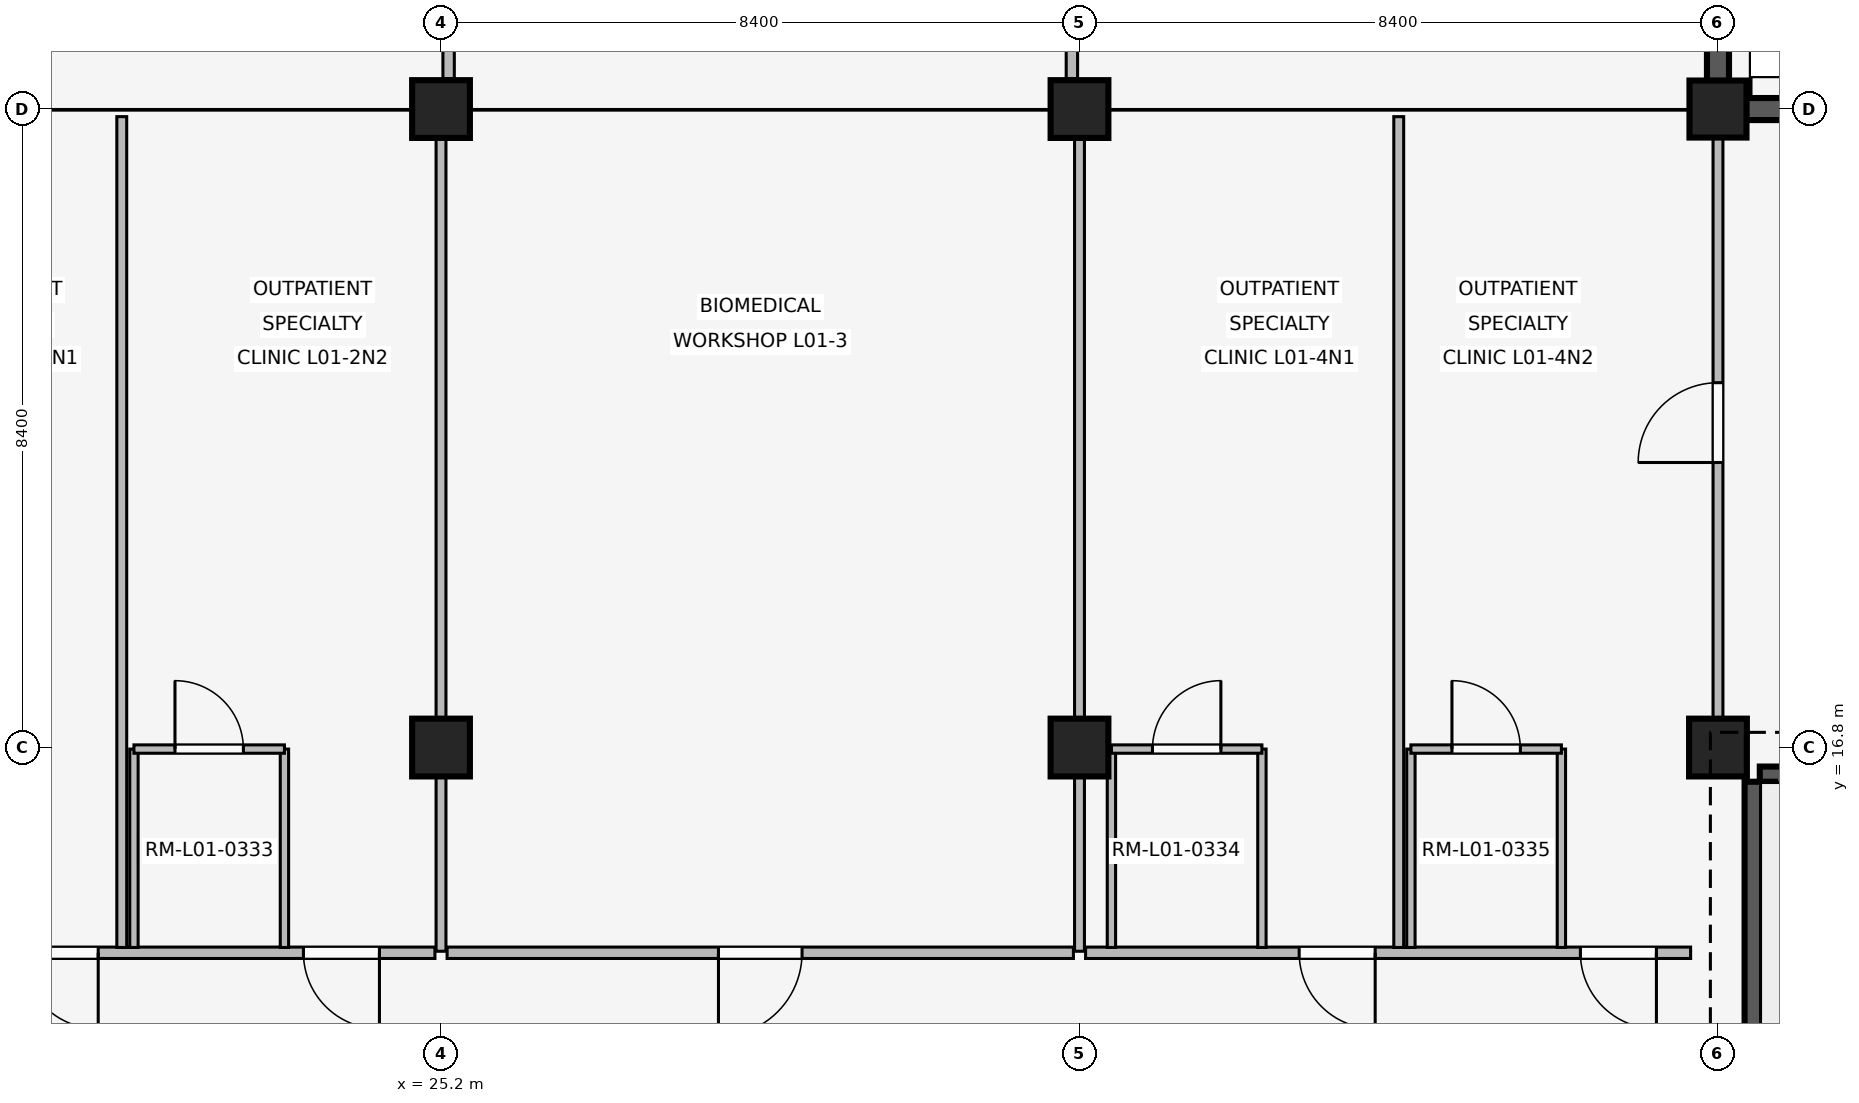
"""IFC4 building model, lengths in metres.
Left out: names, types, materials, properties, quantities, classifications, styles, units other than length and angle.
Written with IfcOpenShell. Run it as: python <this file> out.ifc"""

import sys

from ifc_helpers import new_model, si_unit, direction, frame, frame_2d, origin, origin_2d, place, context, subcontext, project, spatial, rectangle, extrude, element, fill, save


model = new_model("IFC4")
c1 = context("Model", 3, precision=1e-05, world=origin(), true_north=direction((0.0, 1.0)))
c2 = subcontext(c1, "Body", "Model", "MODEL_VIEW")
j1 = project(units=[si_unit("LENGTHUNIT", "METRE"), si_unit("PLANEANGLEUNIT", "RADIAN")], contexts=[c1])
p1 = place(None, origin())
s1 = spatial("IfcSite", under=j1, at=p1, CompositionType="ELEMENT")
p2 = place(p1, origin())
s2 = spatial("IfcBuilding", under=s1, at=p2, CompositionType="ELEMENT")
p3 = place(p2, frame((0.0, 0.0, 4.8)))
s3 = spatial("IfcBuildingStorey", under=s2, at=p3, CompositionType="ELEMENT", Elevation=4.8)
for number, where, z_axis, x_axis in (
    (1, (25.2, 16.8, 0.0), (0.0, 0.0, 1.0), (1.0, 0.0, 0.0)),
    (2, (25.2, 25.2, 0.0), (0.0, 0.0, 1.0), (1.0, 0.0, 0.0)),
    (3, (33.6, 16.8, 0.0), (0.0, 0.0, 1.0), (1.0, 0.0, 0.0)),
    (4, (33.6, 25.2, 0.0), (0.0, 0.0, 1.0), (1.0, 0.0, 0.0)),
    (5, (42.0, 16.8, 0.0), (0.0, 0.0, 1.0), (1.0, 0.0, 0.0)),
):
    element("IfcColumn", number, at=place(p3, frame(where, z_axis=z_axis, x_axis=x_axis)), inside=s3, PredefinedType="COLUMN", context=c2, shape_type="SweptSolid", body=[
        extrude(rectangle(XDim=0.76, YDim=0.76, at=origin_2d()), origin(), (0.0, 0.0, 1.0), 3.3),
    ])
p4 = place(p3, frame((42.0, 25.2, 0.0), z_axis=(0.0, 0.0, 1.0), x_axis=(1.0, 0.0, 0.0)))
e6 = element("IfcColumn", 6, at=p4, inside=s3, PredefinedType="COLUMN", context=c2, shape_type="SweptSolid", body=[
    extrude(rectangle(XDim=0.75, YDim=0.75, at=origin_2d()), origin(), (0.0, 0.0, 1.0), 3.3),
])
p5 = place(p3, frame((42.0, 33.23, 0.0), z_axis=(0.0, 0.0, 1.0), x_axis=(0.0, -1.0, 0.0)))
e7 = element("IfcWall", 7, at=p5, inside=s3, PredefinedType="SOLIDWALL", context=c2, shape_type="SweptSolid", body=[
    extrude(rectangle(XDim=7.66, YDim=0.29, at=frame_2d((3.83, 0.0))), origin(), (0.0, 0.0, 1.0), 2.42),
])
p6 = place(p5, frame((1.032, 0.0, 0.85)))
e8 = element("IfcOpeningElement", 8, at=p6, cuts=e7, PredefinedType="OPENING", context=c2, shape_type="SweptSolid", body=[
    extrude(rectangle(XDim=1.46, YDim=0.85, at=frame_2d((0.73, 0.425))), frame((0.0, 0.155, 0.0), z_axis=(0.0, -1.0, 0.0), x_axis=(1.0, 0.0, 0.0)), (0.0, 0.0, 1.0), 0.31),
])
p7 = place(p5, frame((5.168, 0.0, 0.85)))
e9 = element("IfcOpeningElement", 9, at=p7, cuts=e7, PredefinedType="OPENING", context=c2, shape_type="SweptSolid", body=[
    extrude(rectangle(XDim=1.46, YDim=0.85, at=frame_2d((0.73, 0.425))), frame((0.0, 0.155, 0.0), z_axis=(0.0, -1.0, 0.0), x_axis=(1.0, 0.0, 0.0)), (0.0, 0.0, 1.0), 0.31),
])
p8 = place(p3, frame((42.37, 25.2, 0.0), z_axis=(0.0, 0.0, 1.0), x_axis=(1.0, 0.0, 0.0)))
e10 = element("IfcWall", 10, at=p8, inside=s3, PredefinedType="SOLIDWALL", context=c2, shape_type="SweptSolid", body=[
    extrude(rectangle(XDim=7.66, YDim=0.29, at=frame_2d((3.83, 0.0))), origin(), (0.0, 0.0, 1.0), 2.42),
])
p9 = place(p8, frame((1.032, 0.0, 0.85)))
e11 = element("IfcOpeningElement", 11, at=p9, cuts=e10, PredefinedType="OPENING", context=c2, shape_type="SweptSolid", body=[
    extrude(rectangle(XDim=1.46, YDim=0.85, at=frame_2d((0.73, 0.425))), frame((0.0, 0.155, 0.0), z_axis=(0.0, -1.0, 0.0), x_axis=(1.0, 0.0, 0.0)), (0.0, 0.0, 1.0), 0.31),
])
p10 = place(p8, frame((5.168, 0.0, 0.85)))
e12 = element("IfcOpeningElement", 12, at=p10, cuts=e10, PredefinedType="OPENING", context=c2, shape_type="SweptSolid", body=[
    extrude(rectangle(XDim=1.46, YDim=0.85, at=frame_2d((0.73, 0.425))), frame((0.0, 0.155, 0.0), z_axis=(0.0, -1.0, 0.0), x_axis=(1.0, 0.0, 0.0)), (0.0, 0.0, 1.0), 0.31),
])
p11 = place(p3, frame((42.55, 16.35, 0.0), z_axis=(0.0, 0.0, 1.0), x_axis=(1.0, 0.0, 0.0)))
e13 = element("IfcWall", 13, at=p11, inside=s3, PredefinedType="SHEAR", context=c2, shape_type="SweptSolid", body=[
    extrude(rectangle(XDim=7.5, YDim=0.4, at=frame_2d((3.75, 0.0))), origin(), (0.0, 0.0, 1.0), 3.02),
])
p12 = place(p3, frame((42.55, 8.8, 0.0), z_axis=(0.0, 0.0, 1.0), x_axis=(0.0, 1.0, 0.0)))
e14 = element("IfcWall", 14, at=p12, inside=s3, PredefinedType="SHEAR", context=c2, shape_type="SweptSolid", body=[
    extrude(rectangle(XDim=7.55, YDim=0.4, at=frame_2d((3.775, 0.0))), origin(), (0.0, 0.0, 1.0), 3.02),
])
p13 = place(p12, frame((0.28, 0.0, 0.0)))
e15 = element("IfcOpeningElement", 15, at=p13, cuts=e14, PredefinedType="OPENING", context=c2, shape_type="SweptSolid", body=[
    extrude(rectangle(XDim=1.0, YDim=2.15, at=frame_2d((0.5, 1.075))), frame((0.0, 0.21, 0.0), z_axis=(0.0, -1.0, 0.0), x_axis=(1.0, 0.0, 0.0)), (0.0, 0.0, 1.0), 0.42),
])
p14 = place(p3, frame((25.12, 14.1, 0.0), z_axis=(0.0, 0.0, 1.0), x_axis=(-1.0, 0.0, 0.0)))
e16 = element("IfcWall", 16, at=p14, inside=s3, PredefinedType="PARTITIONING", context=c2, shape_type="SweptSolid", body=[
    extrude(rectangle(XDim=8.24, YDim=0.15, at=frame_2d((4.12, 0.0))), origin(), (0.0, 0.0, 1.0), 2.4),
])
p15 = place(p14, frame((0.73, 0.0, 0.0)))
e17 = element("IfcOpeningElement", 17, at=p15, cuts=e16, PredefinedType="OPENING", context=c2, shape_type="SweptSolid", body=[
    extrude(rectangle(XDim=1.0, YDim=2.15, at=frame_2d((0.5, 1.075))), frame((0.0, 0.085, 0.0), z_axis=(0.0, -1.0, 0.0), x_axis=(1.0, 0.0, 0.0)), (0.0, 0.0, 1.0), 0.17),
])
p16 = place(p14, frame((4.43, 0.0, 0.0)))
e18 = element("IfcOpeningElement", 18, at=p16, cuts=e16, PredefinedType="OPENING", context=c2, shape_type="SweptSolid", body=[
    extrude(rectangle(XDim=1.0, YDim=2.15, at=frame_2d((0.5, 1.075))), frame((0.0, 0.085, 0.0), z_axis=(0.0, -1.0, 0.0), x_axis=(1.0, 0.0, 0.0)), (0.0, 0.0, 1.0), 0.17),
])
p17 = place(p3, frame((21.0, 14.17, 0.0), z_axis=(0.0, 0.0, 1.0), x_axis=(0.0, 1.0, 0.0)))
e19 = element("IfcWall", 19, at=p17, inside=s3, PredefinedType="PARTITIONING", context=c2, shape_type="SweptSolid", body=[
    extrude(rectangle(XDim=10.93, YDim=0.13, at=frame_2d((5.465, 0.0))), origin(), (0.0, 0.0, 1.0), 2.4),
])
for number, where, z_axis, x_axis in (
    (20, (21.16, 14.17, 0.0), (0.0, 0.0, 1.0), (0.0, 1.0, 0.0)),
    (21, (23.14, 14.17, 0.0), (0.0, 0.0, 1.0), (0.0, 1.0, 0.0)),
):
    element("IfcWall", number, at=place(p3, frame(where, z_axis=z_axis, x_axis=x_axis)), inside=s3, PredefinedType="PARTITIONING", context=c2, shape_type="SweptSolid", body=[
        extrude(rectangle(XDim=2.61, YDim=0.11, at=frame_2d((1.305, 0.0))), origin(), (0.0, 0.0, 1.0), 2.4),
    ])
p18 = place(p3, frame((21.16, 16.78, 0.0), z_axis=(0.0, 0.0, 1.0), x_axis=(1.0, 0.0, 0.0)))
e22 = element("IfcWall", 22, at=p18, inside=s3, PredefinedType="PARTITIONING", context=c2, shape_type="SweptSolid", body=[
    extrude(rectangle(XDim=1.98, YDim=0.11, at=frame_2d((0.99, 0.0))), origin(), (0.0, 0.0, 1.0), 2.4),
])
p19 = place(p18, frame((0.54, 0.0, 0.0)))
e23 = element("IfcOpeningElement", 23, at=p19, cuts=e22, PredefinedType="OPENING", context=c2, shape_type="SweptSolid", body=[
    extrude(rectangle(XDim=0.9, YDim=2.1, at=frame_2d((0.45, 1.05))), frame((0.0, 0.065, 0.0), z_axis=(0.0, -1.0, 0.0), x_axis=(1.0, 0.0, 0.0)), (0.0, 0.0, 1.0), 0.13),
])
p20 = place(p3, frame((25.2, 14.12, 0.0), z_axis=(0.0, 0.0, 1.0), x_axis=(0.0, 1.0, 0.0)))
e24 = element("IfcWall", 24, at=p20, inside=s3, PredefinedType="PARTITIONING", context=c2, shape_type="SweptSolid", body=[
    extrude(rectangle(XDim=10.94, YDim=0.13, at=frame_2d((5.47, 0.0))), origin(), (0.0, 0.0, 1.0), 2.4),
])
p21 = place(p3, frame((33.52, 14.1, 0.0), z_axis=(0.0, 0.0, 1.0), x_axis=(-1.0, 0.0, 0.0)))
e25 = element("IfcWall", 25, at=p21, inside=s3, PredefinedType="PARTITIONING", context=c2, shape_type="SweptSolid", body=[
    extrude(rectangle(XDim=8.24, YDim=0.15, at=frame_2d((4.12, 0.0))), origin(), (0.0, 0.0, 1.0), 2.4),
])
p22 = place(p21, frame((3.57, 0.0, 0.0)))
e26 = element("IfcOpeningElement", 26, at=p22, cuts=e25, PredefinedType="OPENING", context=c2, shape_type="SweptSolid", body=[
    extrude(rectangle(XDim=1.1, YDim=2.2, at=frame_2d((0.55, 1.1))), frame((0.0, 0.085, 0.0), z_axis=(0.0, -1.0, 0.0), x_axis=(1.0, 0.0, 0.0)), (0.0, 0.0, 1.0), 0.17),
])
p23 = place(p3, frame((33.6, 14.12, 0.0), z_axis=(0.0, 0.0, 1.0), x_axis=(0.0, 1.0, 0.0)))
e27 = element("IfcWall", 27, at=p23, inside=s3, PredefinedType="PARTITIONING", context=c2, shape_type="SweptSolid", body=[
    extrude(rectangle(XDim=10.94, YDim=0.13, at=frame_2d((5.47, 0.0))), origin(), (0.0, 0.0, 1.0), 2.4),
])
p24 = place(p3, frame((41.64, 14.1, 0.0), z_axis=(0.0, 0.0, 1.0), x_axis=(-1.0, 0.0, 0.0)))
e28 = element("IfcWall", 28, at=p24, inside=s3, PredefinedType="PARTITIONING", context=c2, shape_type="SweptSolid", body=[
    extrude(rectangle(XDim=7.96, YDim=0.15, at=frame_2d((3.98, 0.0))), origin(), (0.0, 0.0, 1.0), 2.4),
])
p25 = place(p24, frame((0.45, 0.0, 0.0)))
e29 = element("IfcOpeningElement", 29, at=p25, cuts=e28, PredefinedType="OPENING", context=c2, shape_type="SweptSolid", body=[
    extrude(rectangle(XDim=1.0, YDim=2.15, at=frame_2d((0.5, 1.075))), frame((0.0, 0.085, 0.0), z_axis=(0.0, -1.0, 0.0), x_axis=(1.0, 0.0, 0.0)), (0.0, 0.0, 1.0), 0.17),
])
p26 = place(p24, frame((4.15, 0.0, 0.0)))
e30 = element("IfcOpeningElement", 30, at=p26, cuts=e28, PredefinedType="OPENING", context=c2, shape_type="SweptSolid", body=[
    extrude(rectangle(XDim=1.0, YDim=2.15, at=frame_2d((0.5, 1.075))), frame((0.0, 0.085, 0.0), z_axis=(0.0, -1.0, 0.0), x_axis=(1.0, 0.0, 0.0)), (0.0, 0.0, 1.0), 0.17),
])
p27 = place(p3, frame((37.8, 14.17, 0.0), z_axis=(0.0, 0.0, 1.0), x_axis=(0.0, 1.0, 0.0)))
e31 = element("IfcWall", 31, at=p27, inside=s3, PredefinedType="PARTITIONING", context=c2, shape_type="SweptSolid", body=[
    extrude(rectangle(XDim=10.93, YDim=0.13, at=frame_2d((5.465, 0.0))), origin(), (0.0, 0.0, 1.0), 2.4),
])
for number, where, z_axis, x_axis in (
    (32, (34.02, 14.17, 0.0), (0.0, 0.0, 1.0), (0.0, 1.0, 0.0)),
    (33, (36.0, 14.17, 0.0), (0.0, 0.0, 1.0), (0.0, 1.0, 0.0)),
):
    element("IfcWall", number, at=place(p3, frame(where, z_axis=z_axis, x_axis=x_axis)), inside=s3, PredefinedType="PARTITIONING", context=c2, shape_type="SweptSolid", body=[
        extrude(rectangle(XDim=2.61, YDim=0.11, at=frame_2d((1.305, 0.0))), origin(), (0.0, 0.0, 1.0), 2.4),
    ])
p28 = place(p3, frame((34.02, 16.78, 0.0), z_axis=(0.0, 0.0, 1.0), x_axis=(1.0, 0.0, 0.0)))
e34 = element("IfcWall", 34, at=p28, inside=s3, PredefinedType="PARTITIONING", context=c2, shape_type="SweptSolid", body=[
    extrude(rectangle(XDim=1.98, YDim=0.11, at=frame_2d((0.99, 0.0))), origin(), (0.0, 0.0, 1.0), 2.4),
])
p29 = place(p28, frame((0.54, 0.0, 0.0)))
e35 = element("IfcOpeningElement", 35, at=p29, cuts=e34, PredefinedType="OPENING", context=c2, shape_type="SweptSolid", body=[
    extrude(rectangle(XDim=0.9, YDim=2.1, at=frame_2d((0.45, 1.05))), frame((0.0, 0.065, 0.0), z_axis=(0.0, -1.0, 0.0), x_axis=(1.0, 0.0, 0.0)), (0.0, 0.0, 1.0), 0.13),
])
for number, where, z_axis, x_axis in (
    (36, (37.96, 14.17, 0.0), (0.0, 0.0, 1.0), (0.0, 1.0, 0.0)),
    (37, (39.94, 14.17, 0.0), (0.0, 0.0, 1.0), (0.0, 1.0, 0.0)),
):
    element("IfcWall", number, at=place(p3, frame(where, z_axis=z_axis, x_axis=x_axis)), inside=s3, PredefinedType="PARTITIONING", context=c2, shape_type="SweptSolid", body=[
        extrude(rectangle(XDim=2.61, YDim=0.11, at=frame_2d((1.305, 0.0))), origin(), (0.0, 0.0, 1.0), 2.4),
    ])
p30 = place(p3, frame((37.96, 16.78, 0.0), z_axis=(0.0, 0.0, 1.0), x_axis=(1.0, 0.0, 0.0)))
e38 = element("IfcWall", 38, at=p30, inside=s3, PredefinedType="PARTITIONING", context=c2, shape_type="SweptSolid", body=[
    extrude(rectangle(XDim=1.98, YDim=0.11, at=frame_2d((0.99, 0.0))), origin(), (0.0, 0.0, 1.0), 2.4),
])
p31 = place(p30, frame((0.54, 0.0, 0.0)))
e39 = element("IfcOpeningElement", 39, at=p31, cuts=e38, PredefinedType="OPENING", context=c2, shape_type="SweptSolid", body=[
    extrude(rectangle(XDim=0.9, YDim=2.1, at=frame_2d((0.45, 1.05))), frame((0.0, 0.065, 0.0), z_axis=(0.0, -1.0, 0.0), x_axis=(1.0, 0.0, 0.0)), (0.0, 0.0, 1.0), 0.13),
])
p32 = place(p3, frame((42.0, 17.15, 0.0), z_axis=(0.0, 0.0, 1.0), x_axis=(0.0, 1.0, 0.0)))
e40 = element("IfcWall", 40, at=p32, inside=s3, PredefinedType="PARTITIONING", context=c2, shape_type="SweptSolid", body=[
    extrude(rectangle(XDim=7.91, YDim=0.13, at=frame_2d((3.955, 0.0))), origin(), (0.0, 0.0, 1.0), 2.4),
])
p33 = place(p32, frame((3.4, 0.0, 0.0)))
e41 = element("IfcOpeningElement", 41, at=p33, cuts=e40, PredefinedType="OPENING", context=c2, shape_type="SweptSolid", body=[
    extrude(rectangle(XDim=1.05, YDim=2.2, at=frame_2d((0.525, 1.1))), frame((0.0, 0.075, 0.0), z_axis=(0.0, -1.0, 0.0), x_axis=(1.0, 0.0, 0.0)), (0.0, 0.0, 1.0), 0.15),
])
p34 = place(p3, frame((25.3, 25.6, 0.0), z_axis=(0.0, 0.0, 1.0), x_axis=(0.0, 1.0, 0.0)))
e42 = element("IfcWall", 42, at=p34, inside=s3, PredefinedType="PARTITIONING", context=c2, shape_type="SweptSolid", body=[
    extrude(rectangle(XDim=24.4, YDim=0.15, at=frame_2d((12.2, 0.0))), origin(), (0.0, 0.0, 1.0), 2.4),
])
p35 = place(p34, frame((3.4, 0.0, 0.0)))
e43 = element("IfcOpeningElement", 43, at=p35, cuts=e42, PredefinedType="OPENING", context=c2, shape_type="SweptSolid", body=[
    extrude(rectangle(XDim=0.98, YDim=2.05, at=frame_2d((0.49, 1.025))), frame((0.0, 0.085, 0.0), z_axis=(0.0, -1.0, 0.0), x_axis=(1.0, 0.0, 0.0)), (0.0, 0.0, 1.0), 0.17),
])
p36 = place(p3, frame((33.5, 25.6, 0.0), z_axis=(0.0, 0.0, 1.0), x_axis=(0.0, 1.0, 0.0)))
e44 = element("IfcWall", 44, at=p36, inside=s3, PredefinedType="PARTITIONING", context=c2, shape_type="SweptSolid", body=[
    extrude(rectangle(XDim=66.4, YDim=0.15, at=frame_2d((33.2, 0.0))), origin(), (0.0, 0.0, 1.0), 2.4),
])
p37 = place(p36, frame((3.4, 0.0, 0.0)))
e45 = element("IfcOpeningElement", 45, at=p37, cuts=e44, PredefinedType="OPENING", context=c2, shape_type="SweptSolid", body=[
    extrude(rectangle(XDim=0.98, YDim=2.05, at=frame_2d((0.49, 1.025))), frame((0.0, 0.085, 0.0), z_axis=(0.0, -1.0, 0.0), x_axis=(1.0, 0.0, 0.0)), (0.0, 0.0, 1.0), 0.17),
])
p38 = place(p15, origin())
e46 = element("IfcDoor", 46, at=p38, inside=s3, OperationType="SINGLE_SWING_LEFT", PredefinedType="DOOR", context=c2, shape_type="SweptSolid", body=[
    extrude(rectangle(XDim=1.0, YDim=2.15, at=frame_2d((0.5, 1.075))), frame((0.0, 0.025, 0.0), z_axis=(0.0, -1.0, 0.0), x_axis=(1.0, 0.0, 0.0)), (0.0, 0.0, 1.0), 0.05),
])
fill(e17, e46)
p39 = place(p16, origin())
e47 = element("IfcDoor", 47, at=p39, inside=s3, OperationType="SINGLE_SWING_LEFT", PredefinedType="DOOR", context=c2, shape_type="SweptSolid", body=[
    extrude(rectangle(XDim=1.0, YDim=2.15, at=frame_2d((0.5, 1.075))), frame((0.0, 0.025, 0.0), z_axis=(0.0, -1.0, 0.0), x_axis=(1.0, 0.0, 0.0)), (0.0, 0.0, 1.0), 0.05),
])
fill(e18, e47)
p40 = place(p19, origin())
e48 = element("IfcDoor", 48, at=p40, inside=s3, OperationType="SINGLE_SWING_LEFT", PredefinedType="DOOR", context=c2, shape_type="SweptSolid", body=[
    extrude(rectangle(XDim=0.9, YDim=2.1, at=frame_2d((0.45, 1.05))), frame((0.0, 0.025, 0.0), z_axis=(0.0, -1.0, 0.0), x_axis=(1.0, 0.0, 0.0)), (0.0, 0.0, 1.0), 0.05),
])
fill(e23, e48)
p41 = place(p22, origin())
e49 = element("IfcDoor", 49, at=p41, inside=s3, OperationType="SINGLE_SWING_RIGHT", PredefinedType="DOOR", context=c2, shape_type="SweptSolid", body=[
    extrude(rectangle(XDim=1.1, YDim=2.2, at=frame_2d((0.55, 1.1))), frame((0.0, 0.025, 0.0), z_axis=(0.0, -1.0, 0.0), x_axis=(1.0, 0.0, 0.0)), (0.0, 0.0, 1.0), 0.05),
])
fill(e26, e49)
p42 = place(p25, origin())
e50 = element("IfcDoor", 50, at=p42, inside=s3, OperationType="SINGLE_SWING_LEFT", PredefinedType="DOOR", context=c2, shape_type="SweptSolid", body=[
    extrude(rectangle(XDim=1.0, YDim=2.15, at=frame_2d((0.5, 1.075))), frame((0.0, 0.025, 0.0), z_axis=(0.0, -1.0, 0.0), x_axis=(1.0, 0.0, 0.0)), (0.0, 0.0, 1.0), 0.05),
])
fill(e29, e50)
p43 = place(p26, origin())
e51 = element("IfcDoor", 51, at=p43, inside=s3, OperationType="SINGLE_SWING_LEFT", PredefinedType="DOOR", context=c2, shape_type="SweptSolid", body=[
    extrude(rectangle(XDim=1.0, YDim=2.15, at=frame_2d((0.5, 1.075))), frame((0.0, 0.025, 0.0), z_axis=(0.0, -1.0, 0.0), x_axis=(1.0, 0.0, 0.0)), (0.0, 0.0, 1.0), 0.05),
])
fill(e30, e51)
p44 = place(p29, origin())
e52 = element("IfcDoor", 52, at=p44, inside=s3, OperationType="SINGLE_SWING_RIGHT", PredefinedType="DOOR", context=c2, shape_type="SweptSolid", body=[
    extrude(rectangle(XDim=0.9, YDim=2.1, at=frame_2d((0.45, 1.05))), frame((0.0, 0.025, 0.0), z_axis=(0.0, -1.0, 0.0), x_axis=(1.0, 0.0, 0.0)), (0.0, 0.0, 1.0), 0.05),
])
fill(e35, e52)
p45 = place(p31, origin())
e53 = element("IfcDoor", 53, at=p45, inside=s3, OperationType="SINGLE_SWING_LEFT", PredefinedType="DOOR", context=c2, shape_type="SweptSolid", body=[
    extrude(rectangle(XDim=0.9, YDim=2.1, at=frame_2d((0.45, 1.05))), frame((0.0, 0.025, 0.0), z_axis=(0.0, -1.0, 0.0), x_axis=(1.0, 0.0, 0.0)), (0.0, 0.0, 1.0), 0.05),
])
fill(e39, e53)
p46 = place(p33, origin())
e54 = element("IfcDoor", 54, at=p46, inside=s3, OperationType="SINGLE_SWING_LEFT", PredefinedType="DOOR", context=c2, shape_type="SweptSolid", body=[
    extrude(rectangle(XDim=1.05, YDim=2.2, at=frame_2d((0.525, 1.1))), frame((0.0, 0.025, 0.0), z_axis=(0.0, -1.0, 0.0), x_axis=(1.0, 0.0, 0.0)), (0.0, 0.0, 1.0), 0.05),
])
fill(e41, e54)
save(model, sys.argv[1])
